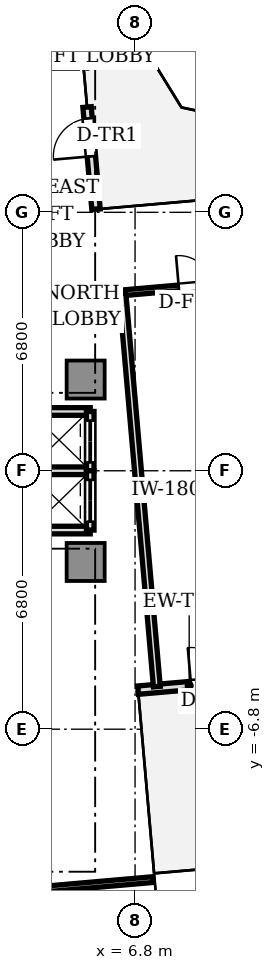
"""IFC4 building model, lengths in metres.
Left out: names, types, materials, properties, quantities, classifications, styles, units other than length and angle.
Written with IfcOpenShell. Run it as: python <this file> out.ifc"""

import sys

from ifc_helpers import new_model, si_unit, direction, frame, frame_2d, origin, origin_2d, place, context, subcontext, project, spatial, rectangle, extrude, source, transform, mapped, element, fill, save


model = new_model("IFC4")
c1 = context("Model", 3, precision=1e-05, world=origin(), true_north=direction((0.0, 1.0)))
c2 = subcontext(c1, "Body", "Model", "MODEL_VIEW")
j1 = project(units=[si_unit("LENGTHUNIT", "METRE"), si_unit("PLANEANGLEUNIT", "RADIAN")], contexts=[c1])
p1 = place(None, origin())
s1 = spatial("IfcSite", under=j1, at=p1, CompositionType="ELEMENT")
p2 = place(p1, origin())
s2 = spatial("IfcBuilding", under=s1, at=p2, CompositionType="ELEMENT")
p3 = place(p2, frame((0.0, 0.0, 178.55)))
s3 = spatial("IfcBuildingStorey", under=s2, at=p3, CompositionType="ELEMENT", Elevation=178.55)
m1 = source(origin(), c2, "Body", "SweptSolid", [
    extrude(rectangle(XDim=1.0, YDim=1.0, at=origin_2d()), origin(), (0.0, 0.0, 1.0), 3.11),
])
for number, where, z_axis, x_axis in (
    (1, (5.5, 2.4, 0.0), (0.0, 0.0, 1.0), (1.0, 0.0, 0.0)),
    (2, (5.5, -2.4, 0.0), (0.0, 0.0, 1.0), (1.0, 0.0, 0.0)),
):
    element("IfcColumn", number, at=place(p3, frame(where, z_axis=z_axis, x_axis=x_axis)), inside=s3, PredefinedType="COLUMN", context=c2, shape_type="MappedRepresentation", body=[
        mapped(m1, transform((0.0, 0.0, 0.0), scale=1.0)),
    ])
p4 = place(p3, frame((6.879, -5.772, 0.0), z_axis=(0.0, 0.0, 1.0), x_axis=(0.996193619346, 0.087168071984, 0.0)))
e3 = element("IfcWall", 3, at=p4, inside=s3, PredefinedType="STANDARD", context=c2, shape_type="SweptSolid", body=[
    extrude(rectangle(XDim=2.7, YDim=0.22, at=frame_2d((1.35, 0.0))), origin(), (0.0, 0.0, 1.0), 3.11),
])
p5 = place(p4, frame((1.4, 0.0, 0.0)))
e4 = element("IfcOpeningElement", 4, at=p5, cuts=e3, PredefinedType="OPENING", context=c2, shape_type="SweptSolid", body=[
    extrude(rectangle(XDim=1.0, YDim=2.2, at=frame_2d((0.5, 1.1))), frame((0.0, 0.12, 0.0), z_axis=(0.0, -1.0, 0.0), x_axis=(1.0, 0.0, 0.0)), (0.0, 0.0, 1.0), 0.24),
])
p6 = place(p3, frame((5.772, 6.879, 0.0), z_axis=(0.0, 0.0, 1.0), x_axis=(-0.087168071984, 0.996193619346, 0.0)))
e5 = element("IfcWall", 5, at=p6, inside=s3, PredefinedType="STANDARD", context=c2, shape_type="SweptSolid", body=[
    extrude(rectangle(XDim=2.7, YDim=0.22, at=frame_2d((1.35, 0.0))), origin(), (0.0, 0.0, 1.0), 3.11),
])
p7 = place(p6, frame((1.4, 0.0, 0.0)))
e6 = element("IfcOpeningElement", 6, at=p7, cuts=e5, PredefinedType="OPENING", context=c2, shape_type="SweptSolid", body=[
    extrude(rectangle(XDim=1.0, YDim=2.2, at=frame_2d((0.5, 1.1))), frame((0.0, 0.12, 0.0), z_axis=(0.0, -1.0, 0.0), x_axis=(1.0, 0.0, 0.0)), (0.0, 0.0, 1.0), 0.24),
])
for number, where, z_axis, x_axis in (
    (7, (3.98, 1.56, 0.0), (0.0, 0.0, 1.0), (1.0, 0.0, 0.0)),
    (8, (3.98, -1.56, 0.0), (0.0, 0.0, 1.0), (1.0, 0.0, 0.0)),
    (9, (3.98, 0.0, 0.0), (0.0, 0.0, 1.0), (1.0, 0.0, 0.0)),
):
    element("IfcWall", number, at=place(p3, frame(where, z_axis=z_axis, x_axis=x_axis)), inside=s3, PredefinedType="SOLIDWALL", context=c2, shape_type="SweptSolid", body=[
        extrude(rectangle(XDim=1.64, YDim=0.2, at=frame_2d((0.82, 0.0))), origin(), (0.0, 0.0, 1.0), 2.66),
    ])
p8 = place(p3, frame((5.62, 0.0, 0.0), z_axis=(0.0, 0.0, 1.0), x_axis=(0.0, 1.0, 0.0)))
e10 = element("IfcWall", 10, at=p8, inside=s3, PredefinedType="SOLIDWALL", context=c2, shape_type="SweptSolid", body=[
    extrude(rectangle(XDim=1.56, YDim=0.2, at=frame_2d((0.78, 0.0))), origin(), (0.0, 0.0, 1.0), 2.66),
])
p9 = place(p8, frame((0.22, 0.0, 0.0)))
e11 = element("IfcOpeningElement", 11, at=p9, cuts=e10, PredefinedType="OPENING", context=c2, shape_type="SweptSolid", body=[
    extrude(rectangle(XDim=1.1, YDim=2.2, at=frame_2d((0.55, 1.1))), frame((0.0, 0.11, 0.0), z_axis=(0.0, -1.0, 0.0), x_axis=(1.0, 0.0, 0.0)), (0.0, 0.0, 1.0), 0.22),
])
p10 = place(p3, frame((5.62, -1.56, 0.0), z_axis=(0.0, 0.0, 1.0), x_axis=(0.0, 1.0, 0.0)))
e12 = element("IfcWall", 12, at=p10, inside=s3, PredefinedType="SOLIDWALL", context=c2, shape_type="SweptSolid", body=[
    extrude(rectangle(XDim=1.56, YDim=0.2, at=frame_2d((0.78, 0.0))), origin(), (0.0, 0.0, 1.0), 2.66),
])
p11 = place(p10, frame((0.22, 0.0, 0.0)))
e13 = element("IfcOpeningElement", 13, at=p11, cuts=e12, PredefinedType="OPENING", context=c2, shape_type="SweptSolid", body=[
    extrude(rectangle(XDim=1.1, YDim=2.2, at=frame_2d((0.55, 1.1))), frame((0.0, 0.11, 0.0), z_axis=(0.0, -1.0, 0.0), x_axis=(1.0, 0.0, 0.0)), (0.0, 0.0, 1.0), 0.22),
])
p12 = place(p3, frame((6.467, 4.681, 0.0), z_axis=(0.0, 0.0, 1.0), x_axis=(0.996195452949, 0.087147114263, 0.0)))
e14 = element("IfcWall", 14, at=p12, inside=s3, PredefinedType="PARTITIONING", context=c2, shape_type="SweptSolid", body=[
    extrude(rectangle(XDim=8.55, YDim=0.15, at=frame_2d((4.275, 0.0))), origin(), (0.0, 0.0, 1.0), 2.66),
])
p13 = place(p12, frame((1.491, 0.0, 0.0)))
e15 = element("IfcOpeningElement", 15, at=p13, cuts=e14, PredefinedType="OPENING", context=c2, shape_type="SweptSolid", body=[
    extrude(rectangle(XDim=0.85, YDim=2.1, at=frame_2d((0.425, 1.05))), frame((0.0, 0.085, 0.0), z_axis=(0.0, -1.0, 0.0), x_axis=(1.0, 0.0, 0.0)), (0.0, 0.0, 1.0), 0.17),
])
p14 = place(p12, frame((4.792, 0.0, 0.0)))
e16 = element("IfcOpeningElement", 16, at=p14, cuts=e14, PredefinedType="OPENING", context=c2, shape_type="SweptSolid", body=[
    extrude(rectangle(XDim=0.85, YDim=2.1, at=frame_2d((0.425, 1.05))), frame((0.0, 0.085, 0.0), z_axis=(0.0, -1.0, 0.0), x_axis=(1.0, 0.0, 0.0)), (0.0, 0.0, 1.0), 0.17),
])
p15 = place(p3, frame((7.373, -5.679, 0.0), z_axis=(0.0, 0.0, 1.0), x_axis=(-0.087163455754, 0.996194023261, 0.0)))
e17 = element("IfcWall", 17, at=p15, inside=s3, PredefinedType="PARTITIONING", context=c2, shape_type="SweptSolid", body=[
    extrude(rectangle(XDim=10.4, YDim=0.18, at=frame_2d((5.2, 0.0))), origin(), (0.0, 0.0, 1.0), 2.66),
])
p16 = place(p3, frame((-5.287, -11.856, 0.0), z_axis=(0.0, 0.0, 1.0), x_axis=(0.996194790044, 0.087154691724, 0.0)))
e18 = element("IfcWall", 18, at=p16, inside=s3, PredefinedType="PARTITIONING", context=c2, shape_type="SweptSolid", body=[
    extrude(rectangle(XDim=12.6, YDim=0.15, at=frame_2d((6.3, 0.0))), origin(), (0.0, 0.0, 1.0), 2.66),
])
p17 = place(p16, frame((5.5, 0.0, 0.0)))
e19 = element("IfcOpeningElement", 19, at=p17, cuts=e18, PredefinedType="OPENING", context=c2, shape_type="SweptSolid", body=[
    extrude(rectangle(XDim=1.6, YDim=2.25, at=frame_2d((0.8, 1.125))), frame((0.0, 0.085, 0.0), z_axis=(0.0, -1.0, 0.0), x_axis=(1.0, 0.0, 0.0)), (0.0, 0.0, 1.0), 0.17),
])
m2 = source(origin(), c2, "Body", "SweptSolid", [
    extrude(rectangle(XDim=1.0, YDim=0.05, at=origin_2d()), origin(), (0.0, 0.0, 1.0), 2.2),
])
p18 = place(p5, frame((0.5, 0.0, 0.0)))
e20 = element("IfcDoor", 20, at=p18, inside=s3, OperationType="SINGLE_SWING_LEFT", PredefinedType="DOOR", context=c2, shape_type="MappedRepresentation", body=[
    mapped(m2, transform((0.0, 0.0, 0.0), scale=1.0)),
])
fill(e4, e20)
p19 = place(p7, frame((0.5, 0.0, 0.0)))
e21 = element("IfcDoor", 21, at=p19, inside=s3, OperationType="SINGLE_SWING_LEFT", PredefinedType="DOOR", context=c2, shape_type="MappedRepresentation", body=[
    mapped(m2, transform((0.0, 0.0, 0.0), scale=1.0)),
])
fill(e6, e21)
m3 = source(origin(), c2, "Body", "SweptSolid", [
    extrude(rectangle(XDim=1.1, YDim=0.05, at=origin_2d()), origin(), (0.0, 0.0, 1.0), 2.2),
])
p20 = place(p9, frame((0.55, 0.0, 0.0)))
e22 = element("IfcDoor", 22, at=p20, inside=s3, OperationType="DOUBLE_DOOR_SLIDING", PredefinedType="DOOR", context=c2, shape_type="MappedRepresentation", body=[
    mapped(m3, transform((0.0, 0.0, 0.0), scale=1.0)),
])
fill(e11, e22)
p21 = place(p11, frame((0.55, 0.0, 0.0)))
e23 = element("IfcDoor", 23, at=p21, inside=s3, OperationType="DOUBLE_DOOR_SLIDING", PredefinedType="DOOR", context=c2, shape_type="MappedRepresentation", body=[
    mapped(m3, transform((0.0, 0.0, 0.0), scale=1.0)),
])
fill(e13, e23)
m4 = source(origin(), c2, "Body", "SweptSolid", [
    extrude(rectangle(XDim=0.85, YDim=0.05, at=origin_2d()), origin(), (0.0, 0.0, 1.0), 2.1),
])
p22 = place(p13, frame((0.425, 0.0, 0.0)))
e24 = element("IfcDoor", 24, at=p22, inside=s3, OperationType="SINGLE_SWING_LEFT", PredefinedType="DOOR", context=c2, shape_type="MappedRepresentation", body=[
    mapped(m4, transform((0.0, 0.0, 0.0), scale=1.0)),
])
fill(e15, e24)
save(model, sys.argv[1])
